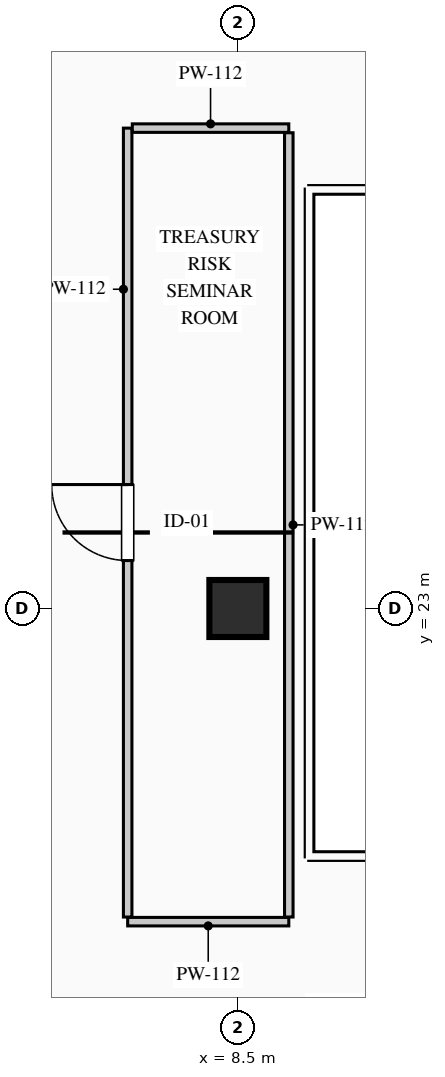
"""IFC4 building model, lengths in metres.
Left out: names, types, materials, properties, quantities, classifications, styles, units other than length and angle.
Written with IfcOpenShell. Run it as: python <this file> out.ifc"""

import sys

from ifc_helpers import new_model, si_unit, direction, frame, frame_2d, origin, origin_2d, place, context, subcontext, project, spatial, rectangle, extrude, element, fill, save


model = new_model("IFC4")
c1 = context("Model", 3, precision=1e-05, world=origin(), true_north=direction((0.0, 1.0)))
c2 = subcontext(c1, "Body", "Model", "MODEL_VIEW")
j1 = project(units=[si_unit("LENGTHUNIT", "METRE"), si_unit("PLANEANGLEUNIT", "RADIAN")], contexts=[c1])
p1 = place(None, origin())
s1 = spatial("IfcSite", under=j1, at=p1, CompositionType="ELEMENT")
p2 = place(p1, origin())
s2 = spatial("IfcBuilding", under=s1, at=p2, CompositionType="ELEMENT")
p3 = place(p2, frame((0.0, 0.0, 292.25)))
s3 = spatial("IfcBuildingStorey", under=s2, at=p3, CompositionType="ELEMENT", Elevation=292.25)
p4 = place(p3, frame((8.5, 23.0, 0.0), z_axis=(0.0, 0.0, 1.0), x_axis=(1.0, 0.0, 0.0)))
e1 = element("IfcColumn", 1, at=p4, inside=s3, PredefinedType="COLUMN", context=c2, shape_type="SweptSolid", body=[
    extrude(rectangle(XDim=0.75, YDim=0.75, at=origin_2d()), origin(), (0.0, 0.0, 1.0), 3.95),
])
p5 = place(p3, frame((9.17, 18.88, 0.0), z_axis=(0.0, 0.0, 1.0), x_axis=(-1.0, 0.0, 0.0)))
e2 = element("IfcWall", 2, at=p5, inside=s3, PredefinedType="PARTITIONING", context=c2, shape_type="SweptSolid", body=[
    extrude(rectangle(XDim=2.12, YDim=0.112, at=frame_2d((1.06, 0.0))), origin(), (0.0, 0.0, 1.0), 3.7),
])
p6 = place(p3, frame((7.05, 18.941, 0.0), z_axis=(0.0, 0.0, 1.0), x_axis=(0.0, 1.0, 0.0)))
e3 = element("IfcWall", 3, at=p6, inside=s3, PredefinedType="PARTITIONING", context=c2, shape_type="SweptSolid", body=[
    extrude(rectangle(XDim=10.379, YDim=0.112, at=frame_2d((5.189, 0.0))), origin(), (0.0, 0.0, 1.0), 3.7),
])
p7 = place(p6, frame((4.689, 0.0, 0.0)))
e4 = element("IfcOpeningElement", 4, at=p7, cuts=e3, PredefinedType="OPENING", context=c2, shape_type="SweptSolid", body=[
    extrude(rectangle(XDim=1.0, YDim=2.15, at=frame_2d((0.5, 1.075))), frame((0.0, 0.066, 0.0), z_axis=(0.0, -1.0, 0.0), x_axis=(1.0, 0.0, 0.0)), (0.0, 0.0, 1.0), 0.132),
])
p8 = place(p3, frame((7.111, 29.32, 0.0), z_axis=(0.0, 0.0, 1.0), x_axis=(1.0, 0.0, 0.0)))
e5 = element("IfcWall", 5, at=p8, inside=s3, PredefinedType="PARTITIONING", context=c2, shape_type="SweptSolid", body=[
    extrude(rectangle(XDim=2.059, YDim=0.112, at=frame_2d((1.029, 0.0))), origin(), (0.0, 0.0, 1.0), 3.7),
])
p9 = place(p3, frame((9.17, 29.259, 0.0), z_axis=(0.0, 0.0, 1.0), x_axis=(0.0, -1.0, 0.0)))
e6 = element("IfcWall", 6, at=p9, inside=s3, PredefinedType="PARTITIONING", context=c2, shape_type="SweptSolid", body=[
    extrude(rectangle(XDim=10.318, YDim=0.112, at=frame_2d((5.159, 0.0))), origin(), (0.0, 0.0, 1.0), 3.325),
])
p10 = place(p7, origin())
e7 = element("IfcDoor", 7, at=p10, inside=s3, OperationType="SINGLE_SWING_RIGHT", PredefinedType="DOOR", context=c2, shape_type="SweptSolid", body=[
    extrude(rectangle(XDim=1.0, YDim=2.15, at=frame_2d((0.5, 1.075))), frame((0.0, 0.025, 0.0), z_axis=(0.0, -1.0, 0.0), x_axis=(1.0, 0.0, 0.0)), (0.0, 0.0, 1.0), 0.05),
])
fill(e4, e7)
save(model, sys.argv[1])
